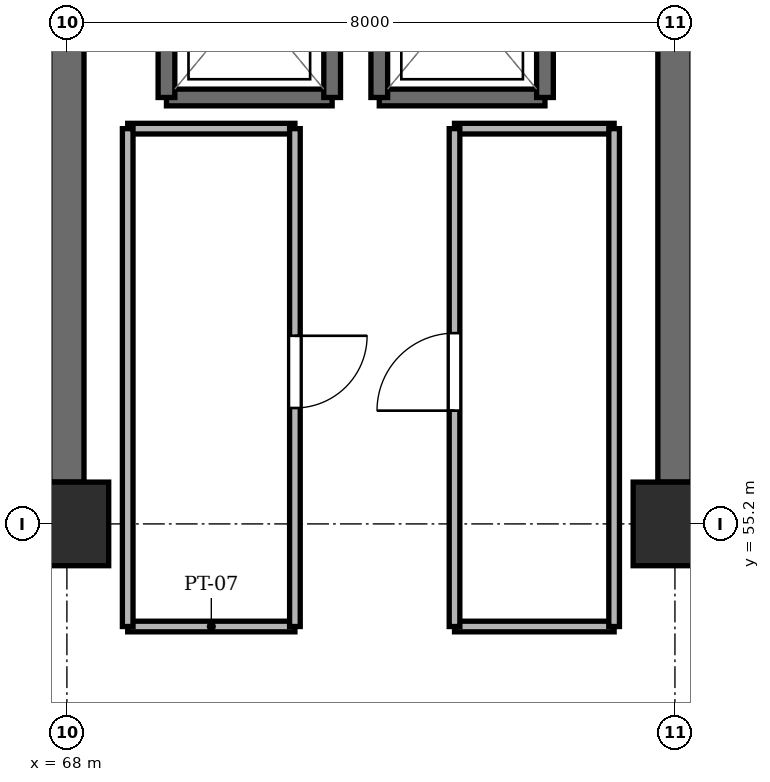
"""IFC4 building model, lengths in metres.
Left out: names, types, materials, properties, quantities, classifications, styles, units other than length and angle.
Written with IfcOpenShell. Run it as: python <this file> out.ifc"""

import sys

from ifc_helpers import new_model, si_unit, direction, frame, frame_2d, origin, origin_2d, place, context, subcontext, project, spatial, rectangle, extrude, element, fill, save


model = new_model("IFC4")
c1 = context("Model", 3, precision=1e-05, world=origin(), true_north=direction((0.0, 1.0)))
c2 = subcontext(c1, "Body", "Model", "MODEL_VIEW")
j1 = project(units=[si_unit("LENGTHUNIT", "METRE"), si_unit("PLANEANGLEUNIT", "RADIAN")], contexts=[c1])
p1 = place(None, origin())
s1 = spatial("IfcSite", under=j1, at=p1, CompositionType="ELEMENT")
p2 = place(p1, origin())
s2 = spatial("IfcBuilding", under=s1, at=p2, CompositionType="ELEMENT")
p3 = place(p2, frame((0.0, 0.0, 34.05)))
s3 = spatial("IfcBuildingStorey", under=s2, at=p3, CompositionType="ELEMENT", Elevation=34.05)
for number, where, z_axis, x_axis in (
    (1, (68.0, 55.2, -0.25), (0.0, 0.0, 1.0), (1.0, 0.0, 0.0)),
    (2, (76.0, 55.2, -0.25), (0.0, 0.0, 1.0), (1.0, 0.0, 0.0)),
):
    element("IfcColumn", number, at=place(p3, frame(where, z_axis=z_axis, x_axis=x_axis)), inside=s3, PredefinedType="COLUMN", context=c2, shape_type="SweptSolid", body=[
        extrude(rectangle(XDim=1.1, YDim=1.1, at=origin_2d()), origin(), (0.0, 0.0, 1.0), 3.25),
    ])
for number, where, z_axis, x_axis in (
    (3, (68.0, 55.75, 0.0), (0.0, 0.0, 1.0), (0.0, 1.0, 0.0)),
    (4, (76.0, 55.75, 0.0), (0.0, 0.0, 1.0), (0.0, 1.0, 0.0)),
):
    element("IfcWall", number, at=place(p3, frame(where, z_axis=z_axis, x_axis=x_axis)), inside=s3, PredefinedType="SHEAR", context=c2, shape_type="SweptSolid", body=[
        extrude(rectangle(XDim=6.2, YDim=0.45, at=frame_2d((3.1, 0.0))), origin(), (0.0, 0.0, 1.0), 3.0),
    ])
p4 = place(p3, frame((69.31, 60.81, 0.0), z_axis=(0.0, 0.0, 1.0), x_axis=(1.0, 0.0, 0.0)))
e5 = element("IfcWall", 5, at=p4, inside=s3, PredefinedType="SHEAR", context=c2, shape_type="SweptSolid", body=[
    extrude(rectangle(XDim=2.18, YDim=0.22, at=frame_2d((1.09, 0.0))), origin(), (0.0, 0.0, 1.0), 3.0),
])
for number, where, z_axis, x_axis in (
    (6, (69.31, 63.39, 0.0), (0.0, 0.0, 1.0), (0.0, -1.0, 0.0)),
    (7, (71.49, 60.81, 0.0), (0.0, 0.0, 1.0), (0.0, 1.0, 0.0)),
):
    element("IfcWall", number, at=place(p3, frame(where, z_axis=z_axis, x_axis=x_axis)), inside=s3, PredefinedType="SHEAR", context=c2, shape_type="SweptSolid", body=[
        extrude(rectangle(XDim=2.58, YDim=0.22, at=frame_2d((1.29, 0.0))), origin(), (0.0, 0.0, 1.0), 3.0),
    ])
p5 = place(p3, frame((72.11, 60.81, 0.0), z_axis=(0.0, 0.0, 1.0), x_axis=(1.0, 0.0, 0.0)))
e8 = element("IfcWall", 8, at=p5, inside=s3, PredefinedType="SHEAR", context=c2, shape_type="SweptSolid", body=[
    extrude(rectangle(XDim=2.18, YDim=0.22, at=frame_2d((1.09, 0.0))), origin(), (0.0, 0.0, 1.0), 3.0),
])
for number, where, z_axis, x_axis in (
    (9, (72.11, 63.39, 0.0), (0.0, 0.0, 1.0), (0.0, -1.0, 0.0)),
    (10, (74.29, 60.81, 0.0), (0.0, 0.0, 1.0), (0.0, 1.0, 0.0)),
):
    element("IfcWall", number, at=place(p3, frame(where, z_axis=z_axis, x_axis=x_axis)), inside=s3, PredefinedType="SHEAR", context=c2, shape_type="SweptSolid", body=[
        extrude(rectangle(XDim=2.58, YDim=0.22, at=frame_2d((1.29, 0.0))), origin(), (0.0, 0.0, 1.0), 3.0),
    ])
for number, where, z_axis, x_axis in (
    (11, (68.8, 53.85, 0.0), (0.0, 0.0, 1.0), (1.0, 0.0, 0.0)),
    (12, (68.8, 60.4, 0.0), (0.0, 0.0, 1.0), (1.0, 0.0, 0.0)),
):
    element("IfcWall", number, at=place(p3, frame(where, z_axis=z_axis, x_axis=x_axis)), inside=s3, PredefinedType="PARTITIONING", context=c2, shape_type="SweptSolid", body=[
        extrude(rectangle(XDim=2.2, YDim=0.14, at=frame_2d((1.1, 0.0))), origin(), (0.0, 0.0, 1.0), 2.53),
    ])
p6 = place(p3, frame((68.8, 53.85, 0.0), z_axis=(0.0, 0.0, 1.0), x_axis=(0.0, 1.0, 0.0)))
e13 = element("IfcWall", 13, at=p6, inside=s3, PredefinedType="PARTITIONING", context=c2, shape_type="SweptSolid", body=[
    extrude(rectangle(XDim=6.55, YDim=0.14, at=frame_2d((3.275, 0.0))), origin(), (0.0, 0.0, 1.0), 2.53),
])
p7 = place(p3, frame((71.0, 53.85, 0.0), z_axis=(0.0, 0.0, 1.0), x_axis=(0.0, 1.0, 0.0)))
e14 = element("IfcWall", 14, at=p7, inside=s3, PredefinedType="PARTITIONING", context=c2, shape_type="SweptSolid", body=[
    extrude(rectangle(XDim=6.55, YDim=0.14, at=frame_2d((3.275, 0.0))), origin(), (0.0, 0.0, 1.0), 2.53),
])
p8 = place(p7, frame((2.875, 0.0, 0.0)))
e15 = element("IfcOpeningElement", 15, at=p8, cuts=e14, PredefinedType="OPENING", context=c2, shape_type="SweptSolid", body=[
    extrude(rectangle(XDim=0.95, YDim=2.1, at=frame_2d((0.475, 1.05))), frame((0.0, 0.082, 0.0), z_axis=(0.0, -1.0, 0.0), x_axis=(1.0, 0.0, 0.0)), (0.0, 0.0, 1.0), 0.164),
])
for number, where, z_axis, x_axis in (
    (16, (73.1, 53.85, 0.0), (0.0, 0.0, 1.0), (1.0, 0.0, 0.0)),
    (17, (73.1, 60.4, 0.0), (0.0, 0.0, 1.0), (1.0, 0.0, 0.0)),
):
    element("IfcWall", number, at=place(p3, frame(where, z_axis=z_axis, x_axis=x_axis)), inside=s3, PredefinedType="PARTITIONING", context=c2, shape_type="SweptSolid", body=[
        extrude(rectangle(XDim=2.1, YDim=0.14, at=frame_2d((1.05, 0.0))), origin(), (0.0, 0.0, 1.0), 2.53),
    ])
p9 = place(p3, frame((73.1, 53.85, 0.0), z_axis=(0.0, 0.0, 1.0), x_axis=(0.0, 1.0, 0.0)))
e18 = element("IfcWall", 18, at=p9, inside=s3, PredefinedType="PARTITIONING", context=c2, shape_type="SweptSolid", body=[
    extrude(rectangle(XDim=6.55, YDim=0.14, at=frame_2d((3.275, 0.0))), origin(), (0.0, 0.0, 1.0), 2.53),
])
p10 = place(p9, frame((2.84, 0.0, 0.0)))
e19 = element("IfcOpeningElement", 19, at=p10, cuts=e18, PredefinedType="OPENING", context=c2, shape_type="SweptSolid", body=[
    extrude(rectangle(XDim=1.02, YDim=2.1, at=frame_2d((0.51, 1.05))), frame((0.0, 0.082, 0.0), z_axis=(0.0, -1.0, 0.0), x_axis=(1.0, 0.0, 0.0)), (0.0, 0.0, 1.0), 0.164),
])
p11 = place(p3, frame((75.2, 53.85, 0.0), z_axis=(0.0, 0.0, 1.0), x_axis=(0.0, 1.0, 0.0)))
e20 = element("IfcWall", 20, at=p11, inside=s3, PredefinedType="PARTITIONING", context=c2, shape_type="SweptSolid", body=[
    extrude(rectangle(XDim=6.55, YDim=0.14, at=frame_2d((3.275, 0.0))), origin(), (0.0, 0.0, 1.0), 2.53),
])
p12 = place(p8, frame((0.95, 0.0, 0.0), z_axis=(0.0, 0.0, 1.0), x_axis=(-1.0, 0.0, 0.0)))
e21 = element("IfcDoor", 21, at=p12, inside=s3, OperationType="SINGLE_SWING_RIGHT", PredefinedType="DOOR", context=c2, shape_type="SweptSolid", body=[
    extrude(rectangle(XDim=0.95, YDim=2.1, at=frame_2d((0.475, 1.05))), frame((0.0, 0.025, 0.0), z_axis=(0.0, -1.0, 0.0), x_axis=(1.0, 0.0, 0.0)), (0.0, 0.0, 1.0), 0.05),
])
fill(e15, e21)
p13 = place(p10, origin())
e22 = element("IfcDoor", 22, at=p13, inside=s3, OperationType="SINGLE_SWING_LEFT", PredefinedType="DOOR", context=c2, shape_type="SweptSolid", body=[
    extrude(rectangle(XDim=1.02, YDim=2.1, at=frame_2d((0.51, 1.05))), frame((0.0, 0.025, 0.0), z_axis=(0.0, -1.0, 0.0), x_axis=(1.0, 0.0, 0.0)), (0.0, 0.0, 1.0), 0.05),
])
fill(e19, e22)
save(model, sys.argv[1])
